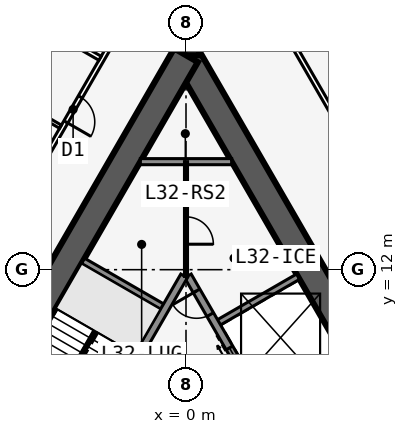
"""IFC4 building model, lengths in metres.
Left out: names, types, materials, properties, quantities, classifications, styles, units other than length and angle.
Written with IfcOpenShell. Run it as: python <this file> out.ifc"""

import sys

from ifc_helpers import new_model, si_unit, direction, frame, frame_2d, origin, place, context, subcontext, project, spatial, rectangle, extrude, element, fill, save


model = new_model("IFC4")
c1 = context("Model", 3, precision=1e-05, world=origin(), true_north=direction((0.0, 1.0)))
c2 = subcontext(c1, "Body", "Model", "MODEL_VIEW")
j1 = project(units=[si_unit("LENGTHUNIT", "METRE"), si_unit("PLANEANGLEUNIT", "RADIAN")], contexts=[c1])
p1 = place(None, origin())
s1 = spatial("IfcSite", under=j1, at=p1, CompositionType="ELEMENT")
p2 = place(p1, origin())
s2 = spatial("IfcBuilding", under=s1, at=p2, CompositionType="ELEMENT")
p3 = place(p2, frame((0.0, 0.0, 124.9)))
s3 = spatial("IfcBuildingStorey", under=s2, at=p3, CompositionType="ELEMENT", Elevation=124.9)
p4 = place(p3, frame((16.5, -9.526, 0.0), z_axis=(0.0, 0.0, 1.0), x_axis=(-0.499999749417, 0.866025548458, 0.0)))
e1 = element("IfcWall", 1, at=p4, inside=s3, PredefinedType="SHEAR", context=c2, shape_type="SweptSolid", body=[
    extrude(rectangle(XDim=33.0, YDim=0.9, at=frame_2d((16.5, 0.0))), origin(), (0.0, 0.0, 1.0), 3.4),
])
p5 = place(p4, frame((14.15, 0.0, 0.0)))
e2 = element("IfcOpeningElement", 2, at=p5, cuts=e1, PredefinedType="OPENING", context=c2, shape_type="SweptSolid", body=[
    extrude(rectangle(XDim=1.8, YDim=2.13, at=frame_2d((0.9, 1.065))), frame((0.0, 0.46, 0.0), z_axis=(0.0, -1.0, 0.0), x_axis=(1.0, 0.0, 0.0)), (0.0, 0.0, 1.0), 0.92),
])
p6 = place(p4, frame((12.6, 0.0, 0.0)))
e3 = element("IfcOpeningElement", 3, at=p6, cuts=e1, PredefinedType="OPENING", context=c2, shape_type="SweptSolid", body=[
    extrude(rectangle(XDim=1.0, YDim=2.13, at=frame_2d((0.5, 1.065))), frame((0.0, 0.46, 0.0), z_axis=(0.0, -1.0, 0.0), x_axis=(1.0, 0.0, 0.0)), (0.0, 0.0, 1.0), 0.92),
])
p7 = place(p3, frame((5.379, 2.586, 0.0), z_axis=(0.0, 0.0, 1.0), x_axis=(-0.500001375892, 0.866024609411, 0.0)))
e4 = element("IfcWall", 4, at=p7, inside=s3, PredefinedType="SOLIDWALL", context=c2, shape_type="SweptSolid", body=[
    extrude(rectangle(XDim=10.633, YDim=0.25, at=frame_2d((5.316, 0.0))), origin(), (0.0, 0.0, 1.0), 3.235),
])
p8 = place(p7, frame((9.164, 0.0, 0.0)))
e5 = element("IfcOpeningElement", 5, at=p8, cuts=e4, PredefinedType="OPENING", context=c2, shape_type="SweptSolid", body=[
    extrude(rectangle(XDim=0.9, YDim=2.13, at=frame_2d((0.45, 1.065))), frame((0.0, 0.135, 0.0), z_axis=(0.0, -1.0, 0.0), x_axis=(1.0, 0.0, 0.0)), (0.0, 0.0, 1.0), 0.27),
])
p9 = place(p7, frame((1.0, 0.0, 0.0)))
e6 = element("IfcOpeningElement", 6, at=p9, cuts=e4, PredefinedType="OPENING", context=c2, shape_type="SweptSolid", body=[
    extrude(rectangle(XDim=1.1, YDim=2.13, at=frame_2d((0.55, 1.065))), frame((0.0, 0.135, 0.0), z_axis=(0.0, -1.0, 0.0), x_axis=(1.0, 0.0, 0.0)), (0.0, 0.0, 1.0), 0.27),
])
p10 = place(p7, frame((3.9, 0.0, 0.0)))
e7 = element("IfcOpeningElement", 7, at=p10, cuts=e4, PredefinedType="OPENING", context=c2, shape_type="SweptSolid", body=[
    extrude(rectangle(XDim=1.1, YDim=2.13, at=frame_2d((0.55, 1.065))), frame((0.0, 0.135, 0.0), z_axis=(0.0, -1.0, 0.0), x_axis=(1.0, 0.0, 0.0)), (0.0, 0.0, 1.0), 0.27),
])
p11 = place(p7, frame((6.8, 0.0, 0.0)))
e8 = element("IfcOpeningElement", 8, at=p11, cuts=e4, PredefinedType="OPENING", context=c2, shape_type="SweptSolid", body=[
    extrude(rectangle(XDim=1.1, YDim=2.13, at=frame_2d((0.55, 1.065))), frame((0.0, 0.135, 0.0), z_axis=(0.0, -1.0, 0.0), x_axis=(1.0, 0.0, 0.0)), (0.0, 0.0, 1.0), 0.27),
])
for number, where, z_axis, x_axis in (
    (9, (2.429, 7.696, 0.0), (0.0, 0.0, 1.0), (0.866, 0.5, 0.0)),
    (10, (0.979, 10.207, 0.0), (0.0, 0.0, 1.0), (0.866, 0.5, 0.0)),
):
    element("IfcWall", number, at=place(p3, frame(where, z_axis=z_axis, x_axis=x_axis)), inside=s3, PredefinedType="SOLIDWALL", context=c2, shape_type="SweptSolid", body=[
        extrude(rectangle(XDim=3.125, YDim=0.2, at=frame_2d((1.562, 0.0))), origin(), (0.0, 0.0, 1.0), 3.235),
    ])
p12 = place(p3, frame((0.0, 19.052, 0.0), z_axis=(0.0, 0.0, 1.0), x_axis=(-0.499999749417, -0.866025548458, 0.0)))
e11 = element("IfcWall", 11, at=p12, inside=s3, PredefinedType="SHEAR", context=c2, shape_type="SweptSolid", body=[
    extrude(rectangle(XDim=33.0, YDim=0.9, at=frame_2d((16.5, 0.0))), origin(), (0.0, 0.0, 1.0), 3.4),
])
p13 = place(p12, frame((14.15, 0.0, 0.0)))
e12 = element("IfcOpeningElement", 12, at=p13, cuts=e11, PredefinedType="OPENING", context=c2, shape_type="SweptSolid", body=[
    extrude(rectangle(XDim=1.8, YDim=2.13, at=frame_2d((0.9, 1.065))), frame((0.0, 0.46, 0.0), z_axis=(0.0, -1.0, 0.0), x_axis=(1.0, 0.0, 0.0)), (0.0, 0.0, 1.0), 0.92),
])
p14 = place(p12, frame((12.6, 0.0, 0.0)))
e13 = element("IfcOpeningElement", 13, at=p14, cuts=e11, PredefinedType="OPENING", context=c2, shape_type="SweptSolid", body=[
    extrude(rectangle(XDim=1.0, YDim=2.13, at=frame_2d((0.5, 1.065))), frame((0.0, 0.46, 0.0), z_axis=(0.0, -1.0, 0.0), x_axis=(1.0, 0.0, 0.0)), (0.0, 0.0, 1.0), 0.92),
])
p15 = place(p3, frame((-0.062, 11.794, 0.0), z_axis=(0.0, 0.0, 1.0), x_axis=(-0.500006680225, -0.86602154692, 0.0)))
e14 = element("IfcWall", 14, at=p15, inside=s3, PredefinedType="SOLIDWALL", context=c2, shape_type="SweptSolid", body=[
    extrude(rectangle(XDim=7.733, YDim=0.25, at=frame_2d((3.866, 0.0))), origin(), (0.0, 0.0, 1.0), 3.235),
])
p16 = place(p3, frame((-0.679, 10.727, 0.0), z_axis=(0.0, 0.0, 1.0), x_axis=(-0.866022959057, 0.500004234368, 0.0)))
e15 = element("IfcWall", 15, at=p16, inside=s3, PredefinedType="SOLIDWALL", context=c2, shape_type="SweptSolid", body=[
    extrude(rectangle(XDim=3.125, YDim=0.2, at=frame_2d((1.562, 0.0))), origin(), (0.0, 0.0, 1.0), 3.235),
])
p17 = place(p3, frame((0.0, 19.052, 0.0), z_axis=(0.0, 0.0, 1.0), x_axis=(0.0, 1.0, 0.0)))
e16 = element("IfcWall", 16, at=p17, inside=s3, PredefinedType="SHEAR", context=c2, shape_type="SweptSolid", body=[
    extrude(rectangle(XDim=4.746, YDim=0.9, at=frame_2d((2.373, 0.0))), origin(), (0.0, 0.0, 1.0), 3.4),
])
p18 = place(p17, frame((1.8, 0.0, 0.0)))
e17 = element("IfcOpeningElement", 17, at=p18, cuts=e16, PredefinedType="OPENING", context=c2, shape_type="SweptSolid", body=[
    extrude(rectangle(XDim=1.8, YDim=2.13, at=frame_2d((0.9, 1.065))), frame((0.0, 0.46, 0.0), z_axis=(0.0, -1.0, 0.0), x_axis=(1.0, 0.0, 0.0)), (0.0, 0.0, 1.0), 0.92),
])
p19 = place(p3, frame((21.586, -11.885, 0.0), z_axis=(0.0, 0.0, 1.0), x_axis=(-0.500001915564, 0.86602429783, 0.0)))
e18 = element("IfcWall", 18, at=p19, inside=s3, PredefinedType="PARTITIONING", context=c2, shape_type="SweptSolid", body=[
    extrude(rectangle(XDim=42.172, YDim=0.15, at=frame_2d((21.086, 0.0))), origin(), (0.0, 0.0, 1.0), 3.235),
])
p20 = place(p19, frame((1.911, 0.0, 0.0)))
e19 = element("IfcOpeningElement", 19, at=p20, cuts=e18, PredefinedType="OPENING", context=c2, shape_type="SweptSolid", body=[
    extrude(rectangle(XDim=0.95, YDim=2.13, at=frame_2d((0.475, 1.065))), frame((0.0, 0.085, 0.0), z_axis=(0.0, -1.0, 0.0), x_axis=(1.0, 0.0, 0.0)), (0.0, 0.0, 1.0), 0.17),
])
p21 = place(p19, frame((7.511, 0.0, 0.0)))
e20 = element("IfcOpeningElement", 20, at=p21, cuts=e18, PredefinedType="OPENING", context=c2, shape_type="SweptSolid", body=[
    extrude(rectangle(XDim=0.95, YDim=2.13, at=frame_2d((0.475, 1.065))), frame((0.0, 0.085, 0.0), z_axis=(0.0, -1.0, 0.0), x_axis=(1.0, 0.0, 0.0)), (0.0, 0.0, 1.0), 0.17),
])
p22 = place(p19, frame((14.311, 0.0, 0.0)))
e21 = element("IfcOpeningElement", 21, at=p22, cuts=e18, PredefinedType="OPENING", context=c2, shape_type="SweptSolid", body=[
    extrude(rectangle(XDim=0.95, YDim=2.13, at=frame_2d((0.475, 1.065))), frame((0.0, 0.085, 0.0), z_axis=(0.0, -1.0, 0.0), x_axis=(1.0, 0.0, 0.0)), (0.0, 0.0, 1.0), 0.17),
])
p23 = place(p19, frame((22.511, 0.0, 0.0)))
e22 = element("IfcOpeningElement", 22, at=p23, cuts=e18, PredefinedType="OPENING", context=c2, shape_type="SweptSolid", body=[
    extrude(rectangle(XDim=0.95, YDim=2.13, at=frame_2d((0.475, 1.065))), frame((0.0, 0.085, 0.0), z_axis=(0.0, -1.0, 0.0), x_axis=(1.0, 0.0, 0.0)), (0.0, 0.0, 1.0), 0.17),
])
p24 = place(p19, frame((29.311, 0.0, 0.0)))
e23 = element("IfcOpeningElement", 23, at=p24, cuts=e18, PredefinedType="OPENING", context=c2, shape_type="SweptSolid", body=[
    extrude(rectangle(XDim=0.95, YDim=2.13, at=frame_2d((0.475, 1.065))), frame((0.0, 0.085, 0.0), z_axis=(0.0, -1.0, 0.0), x_axis=(1.0, 0.0, 0.0)), (0.0, 0.0, 1.0), 0.17),
])
p25 = place(p19, frame((39.311, 0.0, 0.0)))
e24 = element("IfcOpeningElement", 24, at=p25, cuts=e18, PredefinedType="OPENING", context=c2, shape_type="SweptSolid", body=[
    extrude(rectangle(XDim=0.95, YDim=2.13, at=frame_2d((0.475, 1.065))), frame((0.0, 0.085, 0.0), z_axis=(0.0, -1.0, 0.0), x_axis=(1.0, 0.0, 0.0)), (0.0, 0.0, 1.0), 0.17),
])
p26 = place(p3, frame((-0.5, 22.836, 0.0), z_axis=(0.0, 0.0, 1.0), x_axis=(-0.500001677587, -0.866024435227, 0.0)))
e25 = element("IfcWall", 25, at=p26, inside=s3, PredefinedType="PARTITIONING", context=c2, shape_type="SweptSolid", body=[
    extrude(rectangle(XDim=39.054, YDim=0.15, at=frame_2d((19.527, 0.0))), origin(), (0.0, 0.0, 1.0), 3.235),
])
p27 = place(p26, frame((0.352, 0.0, 0.0)))
e26 = element("IfcOpeningElement", 26, at=p27, cuts=e25, PredefinedType="OPENING", context=c2, shape_type="SweptSolid", body=[
    extrude(rectangle(XDim=0.95, YDim=2.13, at=frame_2d((0.475, 1.065))), frame((0.0, 0.085, 0.0), z_axis=(0.0, -1.0, 0.0), x_axis=(1.0, 0.0, 0.0)), (0.0, 0.0, 1.0), 0.17),
])
p28 = place(p26, frame((5.952, 0.0, 0.0)))
e27 = element("IfcOpeningElement", 27, at=p28, cuts=e25, PredefinedType="OPENING", context=c2, shape_type="SweptSolid", body=[
    extrude(rectangle(XDim=0.95, YDim=2.13, at=frame_2d((0.475, 1.065))), frame((0.0, 0.085, 0.0), z_axis=(0.0, -1.0, 0.0), x_axis=(1.0, 0.0, 0.0)), (0.0, 0.0, 1.0), 0.17),
])
p29 = place(p26, frame((12.152, 0.0, 0.0)))
e28 = element("IfcOpeningElement", 28, at=p29, cuts=e25, PredefinedType="OPENING", context=c2, shape_type="SweptSolid", body=[
    extrude(rectangle(XDim=0.95, YDim=2.13, at=frame_2d((0.475, 1.065))), frame((0.0, 0.085, 0.0), z_axis=(0.0, -1.0, 0.0), x_axis=(1.0, 0.0, 0.0)), (0.0, 0.0, 1.0), 0.17),
])
p30 = place(p26, frame((15.352, 0.0, 0.0)))
e29 = element("IfcOpeningElement", 29, at=p30, cuts=e25, PredefinedType="OPENING", context=c2, shape_type="SweptSolid", body=[
    extrude(rectangle(XDim=0.95, YDim=2.13, at=frame_2d((0.475, 1.065))), frame((0.0, 0.085, 0.0), z_axis=(0.0, -1.0, 0.0), x_axis=(1.0, 0.0, 0.0)), (0.0, 0.0, 1.0), 0.17),
])
p31 = place(p26, frame((22.152, 0.0, 0.0)))
e30 = element("IfcOpeningElement", 30, at=p31, cuts=e25, PredefinedType="OPENING", context=c2, shape_type="SweptSolid", body=[
    extrude(rectangle(XDim=0.95, YDim=2.13, at=frame_2d((0.475, 1.065))), frame((0.0, 0.085, 0.0), z_axis=(0.0, -1.0, 0.0), x_axis=(1.0, 0.0, 0.0)), (0.0, 0.0, 1.0), 0.17),
])
p32 = place(p26, frame((30.352, 0.0, 0.0)))
e31 = element("IfcOpeningElement", 31, at=p32, cuts=e25, PredefinedType="OPENING", context=c2, shape_type="SweptSolid", body=[
    extrude(rectangle(XDim=0.95, YDim=2.13, at=frame_2d((0.475, 1.065))), frame((0.0, 0.085, 0.0), z_axis=(0.0, -1.0, 0.0), x_axis=(1.0, 0.0, 0.0)), (0.0, 0.0, 1.0), 0.17),
])
p33 = place(p26, frame((37.752, 0.0, 0.0)))
e32 = element("IfcOpeningElement", 32, at=p33, cuts=e25, PredefinedType="OPENING", context=c2, shape_type="SweptSolid", body=[
    extrude(rectangle(XDim=0.95, YDim=2.13, at=frame_2d((0.475, 1.065))), frame((0.0, 0.085, 0.0), z_axis=(0.0, -1.0, 0.0), x_axis=(1.0, 0.0, 0.0)), (0.0, 0.0, 1.0), 0.17),
])
p34 = place(p3, frame((-2.829, 18.954, 0.0), z_axis=(0.0, 0.0, 1.0), x_axis=(-0.866015739374, 0.500016738876, 0.0)))
e33 = element("IfcWall", 33, at=p34, inside=s3, PredefinedType="PARTITIONING", context=c2, shape_type="SweptSolid", body=[
    extrude(rectangle(XDim=7.516, YDim=0.15, at=frame_2d((3.758, 0.0))), origin(), (0.0, 0.0, 1.0), 2.389),
])
p35 = place(p3, frame((-4.128, 16.702, 0.0), z_axis=(0.0, 0.0, 1.0), x_axis=(-0.866048967903, 0.499959183527, 0.0)))
e34 = element("IfcWall", 34, at=p35, inside=s3, PredefinedType="PLUMBINGWALL", context=c2, shape_type="SweptSolid", body=[
    extrude(rectangle(XDim=2.44, YDim=0.12, at=frame_2d((1.22, 0.0))), origin(), (0.0, 0.0, 1.0), 3.235),
])
p36 = place(p35, frame((1.25, 0.0, 0.0)))
e35 = element("IfcOpeningElement", 35, at=p36, cuts=e34, PredefinedType="OPENING", context=c2, shape_type="SweptSolid", body=[
    extrude(rectangle(XDim=0.9, YDim=2.13, at=frame_2d((0.45, 1.065))), frame((0.0, 0.07, 0.0), z_axis=(0.0, -1.0, 0.0), x_axis=(1.0, 0.0, 0.0)), (0.0, 0.0, 1.0), 0.14),
])
p37 = place(p3, frame((-1.501, 15.552, 0.0), z_axis=(0.0, 0.0, 1.0), x_axis=(1.0, 0.0, 0.0)))
e36 = element("IfcWall", 36, at=p37, inside=s3, PredefinedType="SOLIDWALL", context=c2, shape_type="SweptSolid", body=[
    extrude(rectangle(XDim=3.002, YDim=0.2, at=frame_2d((1.501, 0.0))), origin(), (0.0, 0.0, 1.0), 3.235),
])
p38 = place(p3, frame((0.0, 15.552, 0.0), z_axis=(0.0, 0.0, 1.0), x_axis=(0.0, -1.0, 0.0)))
e37 = element("IfcWall", 37, at=p38, inside=s3, PredefinedType="PARTITIONING", context=c2, shape_type="SweptSolid", body=[
    extrude(rectangle(XDim=3.775, YDim=0.1, at=frame_2d((1.888, 0.0))), origin(), (0.0, 0.0, 1.0), 3.235),
])
p39 = place(p38, frame((1.815, 0.0, 0.0)))
e38 = element("IfcOpeningElement", 38, at=p39, cuts=e37, PredefinedType="OPENING", context=c2, shape_type="SweptSolid", body=[
    extrude(rectangle(XDim=0.9, YDim=2.13, at=frame_2d((0.45, 1.065))), frame((0.0, 0.06, 0.0), z_axis=(0.0, -1.0, 0.0), x_axis=(1.0, 0.0, 0.0)), (0.0, 0.0, 1.0), 0.12),
])
p40 = place(p3, frame((-2.988, 9.978, 0.0), z_axis=(0.0, 0.0, 1.0), x_axis=(-0.499992232847, -0.866029888106, 0.0)))
e39 = element("IfcWall", 39, at=p40, inside=s3, PredefinedType="SOLIDWALL", context=c2, shape_type="SweptSolid", body=[
    extrude(rectangle(XDim=2.794, YDim=0.1, at=frame_2d((1.397, 0.0))), origin(), (0.0, 0.0, 1.0), 3.4),
])
p41 = place(p28, origin())
e40 = element("IfcDoor", 40, at=p41, inside=s3, OperationType="SINGLE_SWING_RIGHT", PredefinedType="DOOR", context=c2, shape_type="SweptSolid", body=[
    extrude(rectangle(XDim=0.95, YDim=2.13, at=frame_2d((0.475, 1.065))), frame((0.0, 0.025, 0.0), z_axis=(0.0, -1.0, 0.0), x_axis=(1.0, 0.0, 0.0)), (0.0, 0.0, 1.0), 0.05),
])
fill(e27, e40)
p42 = place(p8, origin())
e41 = element("IfcDoor", 41, at=p42, inside=s3, OperationType="SINGLE_SWING_RIGHT", PredefinedType="DOOR", context=c2, shape_type="SweptSolid", body=[
    extrude(rectangle(XDim=0.9, YDim=2.13, at=frame_2d((0.45, 1.065))), frame((0.0, 0.025, 0.0), z_axis=(0.0, -1.0, 0.0), x_axis=(1.0, 0.0, 0.0)), (0.0, 0.0, 1.0), 0.05),
])
fill(e5, e41)
p43 = place(p39, origin())
e42 = element("IfcDoor", 42, at=p43, inside=s3, OperationType="SINGLE_SWING_RIGHT", PredefinedType="DOOR", context=c2, shape_type="SweptSolid", body=[
    extrude(rectangle(XDim=0.9, YDim=2.13, at=frame_2d((0.45, 1.065))), frame((0.0, 0.025, 0.0), z_axis=(0.0, -1.0, 0.0), x_axis=(1.0, 0.0, 0.0)), (0.0, 0.0, 1.0), 0.05),
])
fill(e38, e42)
p44 = place(p11, origin())
e43 = element("IfcDoor", 43, at=p44, inside=s3, OperationType="DOUBLE_DOOR_SLIDING", PredefinedType="USERDEFINED", context=c2, shape_type="SweptSolid", body=[
    extrude(rectangle(XDim=1.1, YDim=2.13, at=frame_2d((0.55, 1.065))), frame((0.0, 0.025, 0.0), z_axis=(0.0, -1.0, 0.0), x_axis=(1.0, 0.0, 0.0)), (0.0, 0.0, 1.0), 0.05),
])
fill(e8, e43)
save(model, sys.argv[1])
